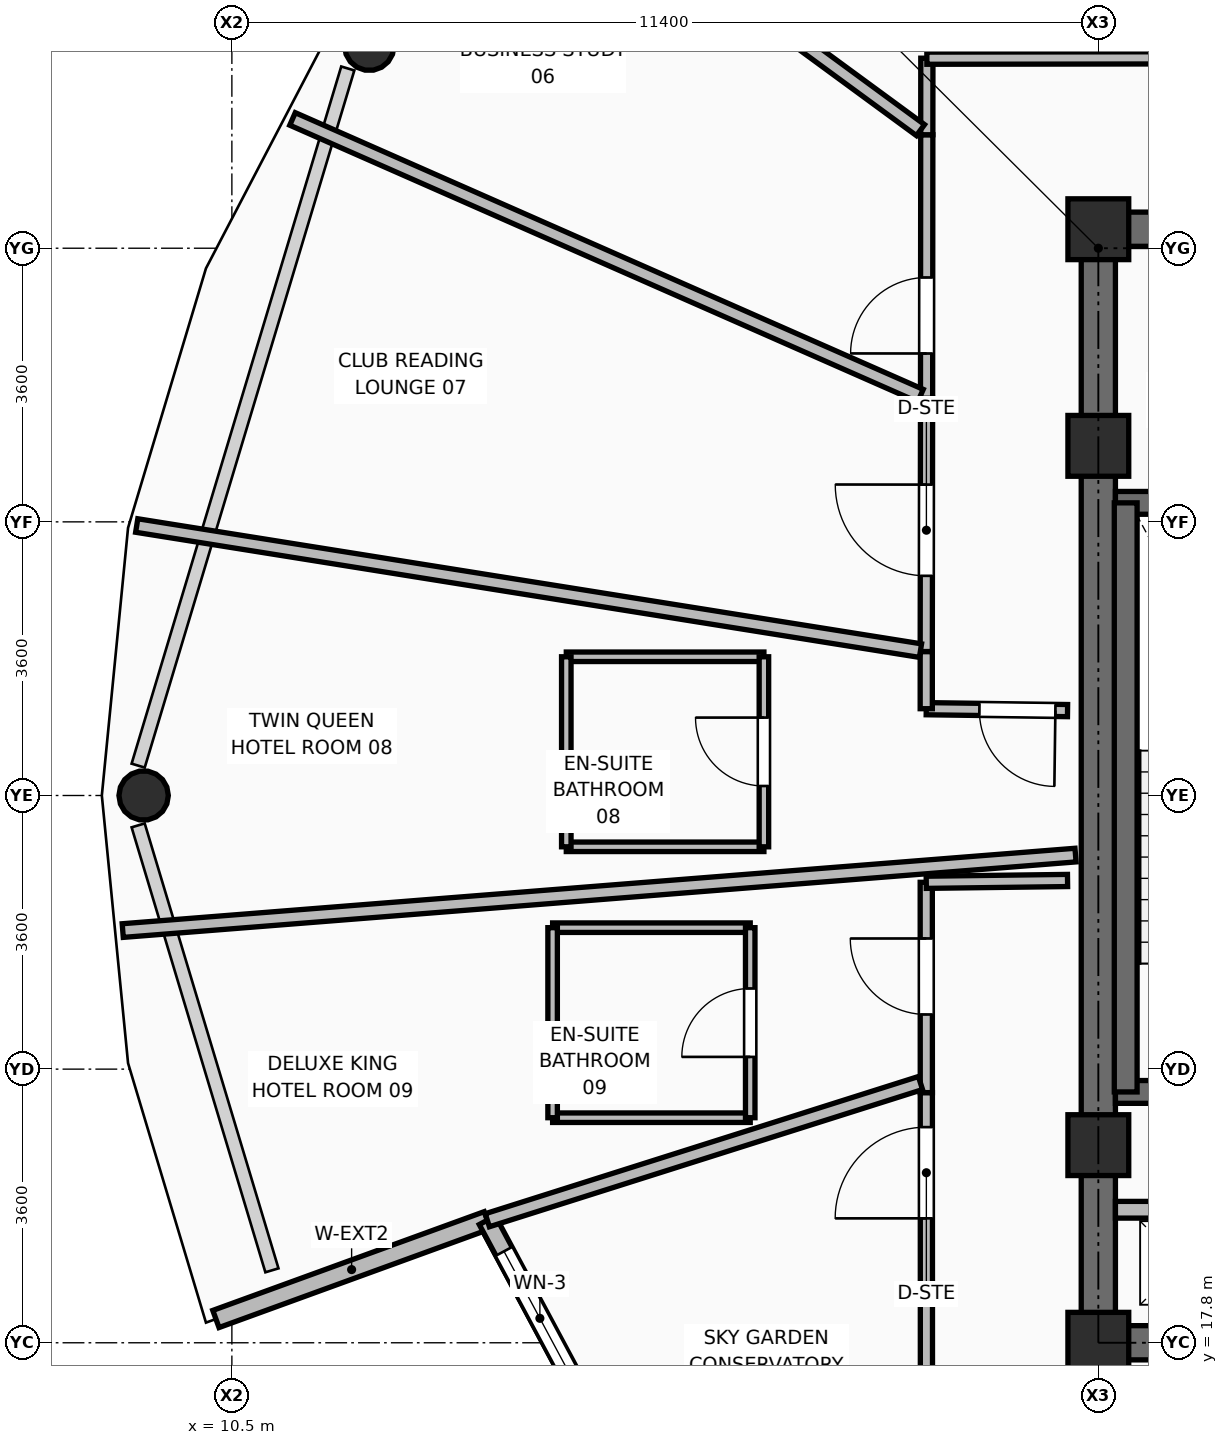
"""IFC4 building model, lengths in metres.
Left out: names, types, materials, properties, quantities, classifications, styles, units other than length and angle.
Written with IfcOpenShell. Run it as: python <this file> out.ifc"""

import sys

from ifc_helpers import new_model, si_unit, direction, frame, frame_2d, origin, origin_2d, place, context, subcontext, project, spatial, rectangle, hollow_circle, extrude, element, fill, save


model = new_model("IFC4")
c1 = context("Model", 3, precision=1e-05, world=origin(), true_north=direction((0.0, 1.0)))
c2 = subcontext(c1, "Body", "Model", "MODEL_VIEW")
j1 = project(units=[si_unit("LENGTHUNIT", "METRE"), si_unit("PLANEANGLEUNIT", "RADIAN")], contexts=[c1])
p1 = place(None, origin())
s1 = spatial("IfcSite", under=j1, at=p1, CompositionType="ELEMENT")
p2 = place(p1, origin())
s2 = spatial("IfcBuilding", under=s1, at=p2, CompositionType="ELEMENT")
p3 = place(p2, frame((0.0, 0.0, 212.4)))
s3 = spatial("IfcBuildingStorey", under=s2, at=p3, CompositionType="ELEMENT", Elevation=212.4)
for number, where, z_axis, x_axis in (
    (1, (21.9, 17.8, 0.0), (0.0, 0.0, 1.0), (1.0, 0.0, 0.0)),
    (2, (21.9, 20.4, 0.0), (0.0, 0.0, 1.0), (1.0, 0.0, 0.0)),
    (3, (21.9, 29.6, 0.0), (0.0, 0.0, 1.0), (1.0, 0.0, 0.0)),
    (4, (21.9, 32.45, 0.0), (0.0, 0.0, 1.0), (1.0, 0.0, 0.0)),
):
    element("IfcColumn", number, at=place(p3, frame(where, z_axis=z_axis, x_axis=x_axis)), inside=s3, PredefinedType="COLUMN", context=c2, shape_type="SweptSolid", body=[
        extrude(rectangle(XDim=0.8, YDim=0.8, at=origin_2d()), origin(), (0.0, 0.0, 1.0), 3.75),
    ])
for number, where, z_axis, x_axis in (
    (5, (12.308, 34.863, 0.0), (0.018, -0.009, 1.0), (0.458, 0.889, 0.0)),
    (6, (9.339, 25.0, 0.0), (0.021, 0.0, 1.0), (0.0, 1.0, 0.0)),
):
    element("IfcColumn", number, at=place(p3, frame(where, z_axis=z_axis, x_axis=x_axis)), inside=s3, PredefinedType="COLUMN", context=c2, shape_type="SweptSolid", body=[
        extrude(hollow_circle(Radius=0.325, WallThickness=0.03, at=origin_2d()), origin(), (0.0, 0.0, 1.0), 3.571),
    ])
p4 = place(p3, frame((10.29, 18.113, 0.0), z_axis=(0.0, 0.0, 1.0), x_axis=(0.939750271596, 0.34186170747, 0.0)))
e7 = element("IfcWall", 7, at=p4, inside=s3, PredefinedType="SOLIDWALL", context=c2, shape_type="SweptSolid", body=[
    extrude(rectangle(XDim=3.8, YDim=0.24, at=frame_2d((1.9, 0.0))), origin(), (0.0, 0.0, 1.0), 3.57),
])
p5 = place(p3, frame((13.861, 19.412, 0.0), z_axis=(0.0, 0.0, 1.0), x_axis=(0.472249177179, -0.881465095539, 0.0)))
e8 = element("IfcWall", 8, at=p5, inside=s3, PredefinedType="SOLIDWALL", context=c2, shape_type="SweptSolid", body=[
    extrude(rectangle(XDim=2.928, YDim=0.24, at=frame_2d((1.464, 0.0))), origin(), (0.0, 0.0, 1.0), 3.57),
])
p6 = place(p5, frame((0.464, 0.0, 0.85)))
e9 = element("IfcOpeningElement", 9, at=p6, cuts=e8, PredefinedType="OPENING", context=c2, shape_type="SweptSolid", body=[
    extrude(rectangle(XDim=2.0, YDim=2.4, at=frame_2d((1.0, 1.2))), frame((0.0, 0.13, 0.0), z_axis=(0.0, -1.0, 0.0), x_axis=(1.0, 0.0, 0.0)), (0.0, 0.0, 1.0), 0.26),
])
p7 = place(p3, frame((21.675, 17.8, 0.0), z_axis=(0.0, 0.0, 1.0), x_axis=(1.0, 0.0, 0.0)))
e10 = element("IfcWall", 10, at=p7, inside=s3, PredefinedType="SHEAR", context=c2, shape_type="SweptSolid", body=[
    extrude(rectangle(XDim=2.075, YDim=0.45, at=frame_2d((1.038, 0.0))), origin(), (0.0, 0.0, 1.0), 3.57),
])
p8 = place(p3, frame((21.675, 32.45, 0.0), z_axis=(0.0, 0.0, 1.0), x_axis=(1.0, 0.0, 0.0)))
e11 = element("IfcWall", 11, at=p8, inside=s3, PredefinedType="SHEAR", context=c2, shape_type="SweptSolid", body=[
    extrude(rectangle(XDim=19.65, YDim=0.45, at=frame_2d((9.825, 0.0))), origin(), (0.0, 0.0, 1.0), 3.57),
])
p9 = place(p8, frame((2.075, 0.0, 0.0)))
e12 = element("IfcOpeningElement", 12, at=p9, cuts=e11, PredefinedType="OPENING", context=c2, shape_type="SweptSolid", body=[
    extrude(rectangle(XDim=1.1, YDim=2.1, at=frame_2d((0.55, 1.05))), frame((0.0, 0.235, 0.0), z_axis=(0.0, -1.0, 0.0), x_axis=(1.0, 0.0, 0.0)), (0.0, 0.0, 1.0), 0.47),
])
p10 = place(p8, frame((15.465, 0.0, 0.0)))
e13 = element("IfcOpeningElement", 13, at=p10, cuts=e11, PredefinedType="OPENING", context=c2, shape_type="SweptSolid", body=[
    extrude(rectangle(XDim=1.0, YDim=2.1, at=frame_2d((0.5, 1.05))), frame((0.0, 0.235, 0.0), z_axis=(0.0, -1.0, 0.0), x_axis=(1.0, 0.0, 0.0)), (0.0, 0.0, 1.0), 0.47),
])
p11 = place(p8, frame((17.475, 0.0, 0.0)))
e14 = element("IfcOpeningElement", 14, at=p11, cuts=e11, PredefinedType="OPENING", context=c2, shape_type="SweptSolid", body=[
    extrude(rectangle(XDim=0.9, YDim=2.1, at=frame_2d((0.45, 1.05))), frame((0.0, 0.235, 0.0), z_axis=(0.0, -1.0, 0.0), x_axis=(1.0, 0.0, 0.0)), (0.0, 0.0, 1.0), 0.47),
])
p12 = place(p3, frame((21.9, 18.025, 0.0), z_axis=(0.0, 0.0, 1.0), x_axis=(0.0, 1.0, 0.0)))
e15 = element("IfcWall", 15, at=p12, inside=s3, PredefinedType="SHEAR", context=c2, shape_type="SweptSolid", body=[
    extrude(rectangle(XDim=14.2, YDim=0.45, at=frame_2d((7.1, 0.0))), origin(), (0.0, 0.0, 1.0), 3.57),
])
p13 = place(p3, frame((22.125, 21.1, 0.0), z_axis=(0.0, 0.0, 1.0), x_axis=(1.0, 0.0, 0.0)))
e16 = element("IfcWall", 16, at=p13, inside=s3, PredefinedType="SHEAR", context=c2, shape_type="SweptSolid", body=[
    extrude(rectangle(XDim=3.615, YDim=0.3, at=frame_2d((1.808, 0.0))), origin(), (0.0, 0.0, 1.0), 3.57),
])
p14 = place(p13, frame((2.095, 0.0, 0.0)))
e17 = element("IfcOpeningElement", 17, at=p14, cuts=e16, PredefinedType="OPENING", context=c2, shape_type="SweptSolid", body=[
    extrude(rectangle(XDim=1.05, YDim=2.1, at=frame_2d((0.525, 1.05))), frame((0.0, 0.16, 0.0), z_axis=(0.0, -1.0, 0.0), x_axis=(1.0, 0.0, 0.0)), (0.0, 0.0, 1.0), 0.32),
])
p15 = place(p3, frame((22.125, 28.85, 0.0), z_axis=(0.0, 0.0, 1.0), x_axis=(1.0, 0.0, 0.0)))
e18 = element("IfcWall", 18, at=p15, inside=s3, PredefinedType="SHEAR", context=c2, shape_type="SweptSolid", body=[
    extrude(rectangle(XDim=3.615, YDim=0.3, at=frame_2d((1.808, 0.0))), origin(), (0.0, 0.0, 1.0), 3.57),
])
p16 = place(p3, frame((22.26, 21.1, 0.0), z_axis=(0.0, 0.0, 1.0), x_axis=(0.0, 1.0, 0.0)))
e19 = element("IfcWall", 19, at=p16, inside=s3, PredefinedType="SHEAR", context=c2, shape_type="SweptSolid", body=[
    extrude(rectangle(XDim=7.75, YDim=0.3, at=frame_2d((3.875, 0.0))), origin(), (0.0, 0.0, 1.0), 3.57),
])
p17 = place(p3, frame((22.125, 19.55, 0.0), z_axis=(0.0, 0.0, 1.0), x_axis=(1.0, 0.0, 0.0)))
e20 = element("IfcWall", 20, at=p17, inside=s3, PredefinedType="PARTITIONING", context=c2, shape_type="SweptSolid", body=[
    extrude(rectangle(XDim=1.665, YDim=0.22, at=frame_2d((0.833, 0.0))), origin(), (0.0, 0.0, 1.0), 2.595),
])
p18 = place(p3, frame((21.495, 26.117, 0.0), z_axis=(0.0, 0.0, 1.0), x_axis=(-0.999908537082, 0.013524698532, 0.0)))
e21 = element("IfcWall", 21, at=p18, inside=s3, PredefinedType="PARTITIONING", context=c2, shape_type="SweptSolid", body=[
    extrude(rectangle(XDim=1.859, YDim=0.16, at=frame_2d((0.93, 0.0))), origin(), (0.0, 0.0, 1.0), 2.595),
])
p19 = place(p18, frame((0.16, 0.0, 0.0)))
e22 = element("IfcOpeningElement", 22, at=p19, cuts=e21, PredefinedType="OPENING", context=c2, shape_type="SweptSolid", body=[
    extrude(rectangle(XDim=1.0, YDim=2.1, at=frame_2d((0.5, 1.05))), frame((0.0, 0.09, 0.0), z_axis=(0.0, -1.0, 0.0), x_axis=(1.0, 0.0, 0.0)), (0.0, 0.0, 1.0), 0.18),
])
p20 = place(p3, frame((19.636, 26.142, 0.0), z_axis=(0.0, 0.0, 1.0), x_axis=(0.0, 1.0, 0.0)))
e23 = element("IfcWall", 23, at=p20, inside=s3, PredefinedType="PARTITIONING", context=c2, shape_type="SweptSolid", body=[
    extrude(rectangle(XDim=0.752, YDim=0.16, at=frame_2d((0.376, 0.0))), origin(), (0.0, 0.0, 1.0), 3.55),
])
p21 = place(p3, frame((19.636, 26.894, 0.0), z_axis=(0.0, 0.0, 1.0), x_axis=(0.001172332137, 0.999999312818, 0.0)))
e24 = element("IfcWall", 24, at=p21, inside=s3, PredefinedType="PARTITIONING", context=c2, shape_type="SweptSolid", body=[
    extrude(rectangle(XDim=3.332, YDim=0.16, at=frame_2d((1.666, 0.0))), origin(), (0.0, 0.0, 1.0), 3.55),
])
p22 = place(p21, frame((0.996, 0.0, 0.0)))
e25 = element("IfcOpeningElement", 25, at=p22, cuts=e24, PredefinedType="OPENING", context=c2, shape_type="SweptSolid", body=[
    extrude(rectangle(XDim=1.2, YDim=2.1, at=frame_2d((0.6, 1.05))), frame((0.0, 0.09, 0.0), z_axis=(0.0, -1.0, 0.0), x_axis=(1.0, 0.0, 0.0)), (0.0, 0.0, 1.0), 0.18),
])
p23 = place(p3, frame((19.64, 30.226, 0.0), z_axis=(0.0, 0.0, 1.0), x_axis=(0.000915428107, 0.999999580996, 0.0)))
e26 = element("IfcWall", 26, at=p23, inside=s3, PredefinedType="PARTITIONING", context=c2, shape_type="SweptSolid", body=[
    extrude(rectangle(XDim=3.467, YDim=0.16, at=frame_2d((1.733, 0.0))), origin(), (0.0, 0.0, 1.0), 3.081),
])
p24 = place(p23, frame((0.589, 0.0, 0.0)))
e27 = element("IfcOpeningElement", 27, at=p24, cuts=e26, PredefinedType="OPENING", context=c2, shape_type="SweptSolid", body=[
    extrude(rectangle(XDim=1.0, YDim=2.1, at=frame_2d((0.5, 1.05))), frame((0.0, 0.09, 0.0), z_axis=(0.0, -1.0, 0.0), x_axis=(1.0, 0.0, 0.0)), (0.0, 0.0, 1.0), 0.18),
])
p25 = place(p3, frame((19.643, 33.693, 0.0), z_axis=(0.0, 0.0, 1.0), x_axis=(0.000969931649, 0.999999529616, 0.0)))
e28 = element("IfcWall", 28, at=p25, inside=s3, PredefinedType="PARTITIONING", context=c2, shape_type="SweptSolid", body=[
    extrude(rectangle(XDim=1.007, YDim=0.16, at=frame_2d((0.503, 0.0))), origin(), (0.0, 0.0, 1.0), 3.55),
])
p26 = place(p3, frame((19.644, 34.7, 0.0), z_axis=(0.0, 0.0, 1.0), x_axis=(0.999999060672, 0.00137064024, 0.0)))
e29 = element("IfcWall", 29, at=p26, inside=s3, PredefinedType="PARTITIONING", context=c2, shape_type="SweptSolid", body=[
    extrude(rectangle(XDim=7.303, YDim=0.16, at=frame_2d((3.651, 0.0))), origin(), (0.0, 0.0, 1.0), 3.081),
])
p27 = place(p26, frame((4.498, 0.0, 0.0)))
e30 = element("IfcOpeningElement", 30, at=p27, cuts=e29, PredefinedType="OPENING", context=c2, shape_type="SweptSolid", body=[
    extrude(rectangle(XDim=1.0, YDim=2.1, at=frame_2d((0.5, 1.05))), frame((0.0, 0.09, 0.0), z_axis=(0.0, -1.0, 0.0), x_axis=(1.0, 0.0, 0.0)), (0.0, 0.0, 1.0), 0.18),
])
p28 = place(p3, frame((19.639, 15.453, 0.0), z_axis=(0.0, 0.0, 1.0), x_axis=(-0.000346410302, 0.99999994, 0.0)))
e31 = element("IfcWall", 31, at=p28, inside=s3, PredefinedType="PARTITIONING", context=c2, shape_type="SweptSolid", body=[
    extrude(rectangle(XDim=5.638, YDim=0.16, at=frame_2d((2.819, 0.0))), origin(), (0.0, 0.0, 1.0), 3.081),
])
p29 = place(p28, frame((3.984, 0.0, 0.0)))
e32 = element("IfcOpeningElement", 32, at=p29, cuts=e31, PredefinedType="OPENING", context=c2, shape_type="SweptSolid", body=[
    extrude(rectangle(XDim=1.2, YDim=2.1, at=frame_2d((0.6, 1.05))), frame((0.0, 0.09, 0.0), z_axis=(0.0, -1.0, 0.0), x_axis=(1.0, 0.0, 0.0)), (0.0, 0.0, 1.0), 0.18),
])
p30 = place(p3, frame((19.637, 21.091, 0.0), z_axis=(0.0, 0.0, 1.0), x_axis=(-0.000352951535, 0.999999937713, 0.0)))
e33 = element("IfcWall", 33, at=p30, inside=s3, PredefinedType="PARTITIONING", context=c2, shape_type="SweptSolid", body=[
    extrude(rectangle(XDim=2.767, YDim=0.16, at=frame_2d((1.383, 0.0))), origin(), (0.0, 0.0, 1.0), 3.081),
])
p31 = place(p30, frame((1.028, 0.0, 0.0)))
e34 = element("IfcOpeningElement", 34, at=p31, cuts=e33, PredefinedType="OPENING", context=c2, shape_type="SweptSolid", body=[
    extrude(rectangle(XDim=1.0, YDim=2.1, at=frame_2d((0.5, 1.05))), frame((0.0, 0.09, 0.0), z_axis=(0.0, -1.0, 0.0), x_axis=(1.0, 0.0, 0.0)), (0.0, 0.0, 1.0), 0.18),
])
p32 = place(p3, frame((19.636, 23.858, 0.0), z_axis=(0.0, 0.0, 1.0), x_axis=(0.999915502175, 0.012999558072, 0.0)))
e35 = element("IfcWall", 35, at=p32, inside=s3, PredefinedType="PARTITIONING", context=c2, shape_type="SweptSolid", body=[
    extrude(rectangle(XDim=1.859, YDim=0.16, at=frame_2d((0.93, 0.0))), origin(), (0.0, 0.0, 1.0), 2.595),
])
p33 = place(p3, frame((19.56, 33.754, 0.0), z_axis=(0.0, 0.0, 1.0), x_axis=(-0.80647194287, 0.591272361407, 0.0)))
e36 = element("IfcWall", 36, at=p33, inside=s3, PredefinedType="PARTITIONING", context=c2, shape_type="SweptSolid", body=[
    extrude(rectangle(XDim=6.84, YDim=0.18, at=frame_2d((3.42, 0.0))), origin(), (0.0, 0.0, 1.0), 2.925),
])
p34 = place(p3, frame((19.56, 30.261, 0.0), z_axis=(0.0, 0.0, 1.0), x_axis=(-0.915125928118, 0.403168123351, 0.0)))
e37 = element("IfcWall", 37, at=p34, inside=s3, PredefinedType="PARTITIONING", context=c2, shape_type="SweptSolid", body=[
    extrude(rectangle(XDim=9.028, YDim=0.18, at=frame_2d((4.514, 0.0))), origin(), (0.0, 0.0, 1.0), 2.925),
])
p35 = place(p3, frame((19.56, 26.906, 0.0), z_axis=(0.0, 0.0, 1.0), x_axis=(-0.98749921299, 0.157623933282, 0.0)))
e38 = element("IfcWall", 38, at=p35, inside=s3, PredefinedType="PARTITIONING", context=c2, shape_type="SweptSolid", body=[
    extrude(rectangle(XDim=10.443, YDim=0.18, at=frame_2d((5.221, 0.0))), origin(), (0.0, 0.0, 1.0), 2.925),
])
p36 = place(p3, frame((21.6, 24.216, 0.0), z_axis=(0.0, 0.0, 1.0), x_axis=(-0.996876465471, -0.078976658517, 0.0)))
e39 = element("IfcWall", 39, at=p36, inside=s3, PredefinedType="PARTITIONING", context=c2, shape_type="SweptSolid", body=[
    extrude(rectangle(XDim=12.575, YDim=0.18, at=frame_2d((6.288, 0.0))), origin(), (0.0, 0.0, 1.0), 2.595),
])
p37 = place(p3, frame((19.56, 21.217, 0.0), z_axis=(0.0, 0.0, 1.0), x_axis=(-0.95332988283, -0.301930678309, 0.0)))
e40 = element("IfcWall", 40, at=p37, inside=s3, PredefinedType="PARTITIONING", context=c2, shape_type="SweptSolid", body=[
    extrude(rectangle(XDim=5.978, YDim=0.18, at=frame_2d((2.989, 0.0))), origin(), (0.0, 0.0, 1.0), 3.081),
])
for number, where, z_axis, x_axis in (
    (41, (14.9, 24.325, 0.0), (0.0, 0.0, 1.0), (1.0, 0.0, 0.0)),
    (42, (14.9, 26.825, 0.0), (0.0, 0.0, 1.0), (1.0, 0.0, 0.0)),
):
    element("IfcWall", number, at=place(p3, frame(where, z_axis=z_axis, x_axis=x_axis)), inside=s3, PredefinedType="PARTITIONING", context=c2, shape_type="SweptSolid", body=[
        extrude(rectangle(XDim=2.6, YDim=0.125, at=frame_2d((1.3, 0.0))), origin(), (0.0, 0.0, 1.0), 3.55),
    ])
p38 = place(p3, frame((14.9, 24.325, 0.0), z_axis=(0.0, 0.0, 1.0), x_axis=(0.0, 1.0, 0.0)))
e43 = element("IfcWall", 43, at=p38, inside=s3, PredefinedType="PARTITIONING", context=c2, shape_type="SweptSolid", body=[
    extrude(rectangle(XDim=2.5, YDim=0.125, at=frame_2d((1.25, 0.0))), origin(), (0.0, 0.0, 1.0), 3.55),
])
p39 = place(p3, frame((17.5, 24.325, 0.0), z_axis=(0.0, 0.0, 1.0), x_axis=(0.0, 1.0, 0.0)))
e44 = element("IfcWall", 44, at=p39, inside=s3, PredefinedType="PARTITIONING", context=c2, shape_type="SweptSolid", body=[
    extrude(rectangle(XDim=2.5, YDim=0.125, at=frame_2d((1.25, 0.0))), origin(), (0.0, 0.0, 1.0), 3.55),
])
p40 = place(p39, frame((0.8, 0.0, 0.0)))
e45 = element("IfcOpeningElement", 45, at=p40, cuts=e44, PredefinedType="OPENING", context=c2, shape_type="SweptSolid", body=[
    extrude(rectangle(XDim=0.9, YDim=2.1, at=frame_2d((0.45, 1.05))), frame((0.0, 0.073, 0.0), z_axis=(0.0, -1.0, 0.0), x_axis=(1.0, 0.0, 0.0)), (0.0, 0.0, 1.0), 0.145),
])
p41 = place(p3, frame((14.72, 20.761, 0.0), z_axis=(0.0, 0.0, 1.0), x_axis=(1.0, 0.0, 0.0)))
e46 = element("IfcWall", 46, at=p41, inside=s3, PredefinedType="PARTITIONING", context=c2, shape_type="SweptSolid", body=[
    extrude(rectangle(XDim=2.6, YDim=0.125, at=frame_2d((1.3, 0.0))), origin(), (0.0, 0.0, 1.0), 3.55),
])
p42 = place(p3, frame((14.72, 23.261, 0.0), z_axis=(0.0, 0.0, 1.0), x_axis=(1.0, 0.0, 0.0)))
e47 = element("IfcWall", 47, at=p42, inside=s3, PredefinedType="PARTITIONING", context=c2, shape_type="SweptSolid", body=[
    extrude(rectangle(XDim=2.6, YDim=0.125, at=frame_2d((1.3, 0.0))), origin(), (0.0, 0.0, 1.0), 3.081),
])
p43 = place(p3, frame((14.72, 20.761, 0.0), z_axis=(0.0, 0.0, 1.0), x_axis=(0.0, 1.0, 0.0)))
e48 = element("IfcWall", 48, at=p43, inside=s3, PredefinedType="PARTITIONING", context=c2, shape_type="SweptSolid", body=[
    extrude(rectangle(XDim=2.5, YDim=0.125, at=frame_2d((1.25, 0.0))), origin(), (0.0, 0.0, 1.0), 3.081),
])
p44 = place(p3, frame((17.32, 20.761, 0.0), z_axis=(0.0, 0.0, 1.0), x_axis=(0.0, 1.0, 0.0)))
e49 = element("IfcWall", 49, at=p44, inside=s3, PredefinedType="PARTITIONING", context=c2, shape_type="SweptSolid", body=[
    extrude(rectangle(XDim=2.5, YDim=0.125, at=frame_2d((1.25, 0.0))), origin(), (0.0, 0.0, 1.0), 3.081),
])
p45 = place(p44, frame((0.8, 0.0, 0.0)))
e50 = element("IfcOpeningElement", 50, at=p45, cuts=e49, PredefinedType="OPENING", context=c2, shape_type="SweptSolid", body=[
    extrude(rectangle(XDim=0.9, YDim=2.1, at=frame_2d((0.45, 1.05))), frame((0.0, 0.073, 0.0), z_axis=(0.0, -1.0, 0.0), x_axis=(1.0, 0.0, 0.0)), (0.0, 0.0, 1.0), 0.145),
])
p46 = place(p6, origin())
e51 = element("IfcWindow", 51, at=p46, inside=s3, PartitioningType="SINGLE_PANEL", PredefinedType="WINDOW", context=c2, shape_type="SweptSolid", body=[
    extrude(rectangle(XDim=2.0, YDim=2.4, at=frame_2d((1.0, 1.2))), frame((0.0, 0.03, 0.0), z_axis=(0.0, -1.0, 0.0), x_axis=(1.0, 0.0, 0.0)), (0.0, 0.0, 1.0), 0.06),
])
fill(e9, e51)
p47 = place(p24, origin())
e52 = element("IfcDoor", 52, at=p47, inside=s3, OperationType="SINGLE_SWING_LEFT", PredefinedType="DOOR", context=c2, shape_type="SweptSolid", body=[
    extrude(rectangle(XDim=1.0, YDim=2.1, at=frame_2d((0.5, 1.05))), frame((0.0, 0.025, 0.0), z_axis=(0.0, -1.0, 0.0), x_axis=(1.0, 0.0, 0.0)), (0.0, 0.0, 1.0), 0.05),
])
fill(e27, e52)
p48 = place(p22, origin())
e53 = element("IfcDoor", 53, at=p48, inside=s3, OperationType="SINGLE_SWING_RIGHT", PredefinedType="DOOR", context=c2, shape_type="SweptSolid", body=[
    extrude(rectangle(XDim=1.2, YDim=2.1, at=frame_2d((0.6, 1.05))), frame((0.0, 0.025, 0.0), z_axis=(0.0, -1.0, 0.0), x_axis=(1.0, 0.0, 0.0)), (0.0, 0.0, 1.0), 0.05),
])
fill(e25, e53)
p49 = place(p40, origin())
e54 = element("IfcDoor", 54, at=p49, inside=s3, OperationType="SINGLE_SWING_RIGHT", PredefinedType="DOOR", context=c2, shape_type="SweptSolid", body=[
    extrude(rectangle(XDim=0.9, YDim=2.1, at=frame_2d((0.45, 1.05))), frame((0.0, 0.025, 0.0), z_axis=(0.0, -1.0, 0.0), x_axis=(1.0, 0.0, 0.0)), (0.0, 0.0, 1.0), 0.05),
])
fill(e45, e54)
p50 = place(p19, origin())
e55 = element("IfcDoor", 55, at=p50, inside=s3, OperationType="SINGLE_SWING_LEFT", PredefinedType="DOOR", context=c2, shape_type="SweptSolid", body=[
    extrude(rectangle(XDim=1.0, YDim=2.1, at=frame_2d((0.5, 1.05))), frame((0.0, 0.025, 0.0), z_axis=(0.0, -1.0, 0.0), x_axis=(1.0, 0.0, 0.0)), (0.0, 0.0, 1.0), 0.05),
])
fill(e22, e55)
p51 = place(p45, origin())
e56 = element("IfcDoor", 56, at=p51, inside=s3, OperationType="SINGLE_SWING_LEFT", PredefinedType="DOOR", context=c2, shape_type="SweptSolid", body=[
    extrude(rectangle(XDim=0.9, YDim=2.1, at=frame_2d((0.45, 1.05))), frame((0.0, 0.025, 0.0), z_axis=(0.0, -1.0, 0.0), x_axis=(1.0, 0.0, 0.0)), (0.0, 0.0, 1.0), 0.05),
])
fill(e50, e56)
p52 = place(p31, origin())
e57 = element("IfcDoor", 57, at=p52, inside=s3, OperationType="SINGLE_SWING_RIGHT", PredefinedType="DOOR", context=c2, shape_type="SweptSolid", body=[
    extrude(rectangle(XDim=1.0, YDim=2.1, at=frame_2d((0.5, 1.05))), frame((0.0, 0.025, 0.0), z_axis=(0.0, -1.0, 0.0), x_axis=(1.0, 0.0, 0.0)), (0.0, 0.0, 1.0), 0.05),
])
fill(e34, e57)
p53 = place(p29, origin())
e58 = element("IfcDoor", 58, at=p53, inside=s3, OperationType="SINGLE_SWING_LEFT", PredefinedType="DOOR", context=c2, shape_type="SweptSolid", body=[
    extrude(rectangle(XDim=1.2, YDim=2.1, at=frame_2d((0.6, 1.05))), frame((0.0, 0.025, 0.0), z_axis=(0.0, -1.0, 0.0), x_axis=(1.0, 0.0, 0.0)), (0.0, 0.0, 1.0), 0.05),
])
fill(e32, e58)
save(model, sys.argv[1])
